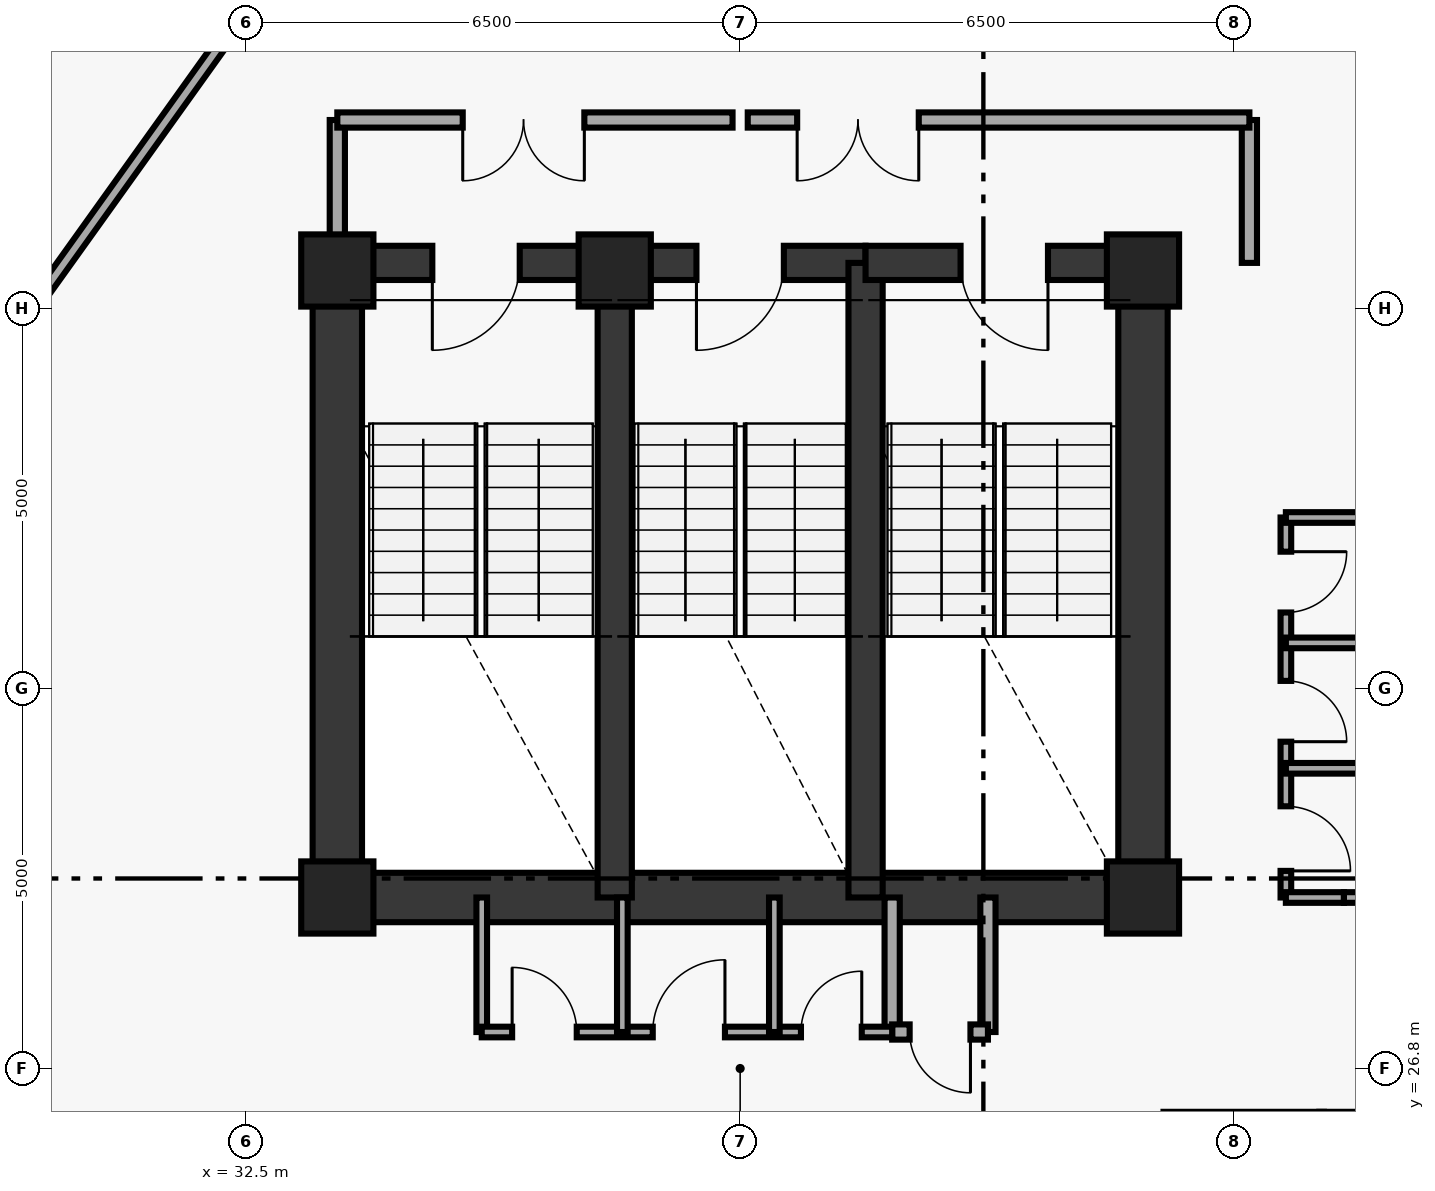
"""IFC4 building model, lengths in metres.
Left out: names, types, materials, properties, quantities, classifications, styles, units other than length and angle.
Written with IfcOpenShell. Run it as: python <this file> out.ifc"""

import sys

from ifc_helpers import new_model, si_unit, direction, frame, frame_2d, origin, origin_2d, place, context, subcontext, project, spatial, rectangle, extrude, element, fill, save


model = new_model("IFC4")
c1 = context("Model", 3, precision=1e-05, world=origin(), true_north=direction((0.0, 1.0)))
c2 = subcontext(c1, "Body", "Model", "MODEL_VIEW")
j1 = project(units=[si_unit("LENGTHUNIT", "METRE"), si_unit("PLANEANGLEUNIT", "RADIAN")], contexts=[c1])
p1 = place(None, origin())
s1 = spatial("IfcSite", under=j1, at=p1, CompositionType="ELEMENT")
p2 = place(p1, origin())
s2 = spatial("IfcBuilding", under=s1, at=p2, CompositionType="ELEMENT")
p3 = place(p2, frame((0.0, 0.0, 195.95)))
s3 = spatial("IfcBuildingStorey", under=s2, at=p3, CompositionType="ELEMENT", Elevation=195.95)
for number, where, z_axis, x_axis in (
    (1, (44.3, 29.05, 0.0), (0.0, 0.0, 1.0), (1.0, 0.0, 0.0)),
    (2, (44.3, 37.3, 0.0), (0.0, 0.0, 1.0), (1.0, 0.0, 0.0)),
    (3, (37.35, 37.3, 0.0), (0.0, 0.0, 1.0), (1.0, 0.0, 0.0)),
    (4, (33.7, 37.3, 0.0), (0.0, 0.0, 1.0), (1.0, 0.0, 0.0)),
    (5, (33.7, 29.05, 0.0), (0.0, 0.0, 1.0), (1.0, 0.0, 0.0)),
):
    element("IfcColumn", number, at=place(p3, frame(where, z_axis=z_axis, x_axis=x_axis)), inside=s3, PredefinedType="PILASTER", context=c2, shape_type="SweptSolid", body=[
        extrude(rectangle(XDim=0.95, YDim=0.95, at=origin_2d()), origin(), (0.0, 0.0, 1.0), 6.88),
    ])
for number, where, z_axis, x_axis in (
    (6, (33.7, 29.05, 0.0), (0.0, 0.0, 1.0), (0.0, 1.0, 0.0)),
    (7, (44.3, 29.05, 0.0), (0.0, 0.0, 1.0), (0.0, 1.0, 0.0)),
):
    element("IfcWall", number, at=place(p3, frame(where, z_axis=z_axis, x_axis=x_axis)), inside=s3, PredefinedType="SHEAR", context=c2, shape_type="SweptSolid", body=[
        extrude(rectangle(XDim=8.35, YDim=0.65, at=frame_2d((4.175, 0.0))), origin(), (0.0, 0.0, 1.0), 6.88),
    ])
p4 = place(p3, frame((33.7, 29.05, 0.0), z_axis=(0.0, 0.0, 1.0), x_axis=(1.0, 0.0, 0.0)))
e8 = element("IfcWall", 8, at=p4, inside=s3, PredefinedType="SHEAR", context=c2, shape_type="SweptSolid", body=[
    extrude(rectangle(XDim=10.6, YDim=0.65, at=frame_2d((5.3, 0.0))), origin(), (0.0, 0.0, 1.0), 6.88),
])
p5 = place(p3, frame((37.35, 37.4, 0.0), z_axis=(0.0, 0.0, 1.0), x_axis=(-1.0, 0.0, 0.0)))
e9 = element("IfcWall", 9, at=p5, inside=s3, PredefinedType="SHEAR", context=c2, shape_type="SweptSolid", body=[
    extrude(rectangle(XDim=3.65, YDim=0.45, at=frame_2d((1.825, 0.0))), origin(), (0.0, 0.0, 1.0), 6.88),
])
p6 = place(p5, frame((1.25, 0.0, 0.0)))
e10 = element("IfcOpeningElement", 10, at=p6, cuts=e9, PredefinedType="OPENING", context=c2, shape_type="SweptSolid", body=[
    extrude(rectangle(XDim=1.15, YDim=2.15, at=frame_2d((0.575, 1.075))), frame((0.0, 0.235, 0.0), z_axis=(0.0, -1.0, 0.0), x_axis=(1.0, 0.0, 0.0)), (0.0, 0.0, 1.0), 0.47),
])
p7 = place(p3, frame((37.35, 29.05, 0.0), z_axis=(0.0, 0.0, 1.0), x_axis=(0.0, 1.0, 0.0)))
e11 = element("IfcWall", 11, at=p7, inside=s3, PredefinedType="SHEAR", context=c2, shape_type="SweptSolid", body=[
    extrude(rectangle(XDim=8.35, YDim=0.45, at=frame_2d((4.175, 0.0))), origin(), (0.0, 0.0, 1.0), 6.88),
])
p8 = place(p3, frame((40.65, 37.4, 0.0), z_axis=(0.0, 0.0, 1.0), x_axis=(-1.0, 0.0, 0.0)))
e12 = element("IfcWall", 12, at=p8, inside=s3, PredefinedType="SHEAR", context=c2, shape_type="SweptSolid", body=[
    extrude(rectangle(XDim=3.3, YDim=0.45, at=frame_2d((1.65, 0.0))), origin(), (0.0, 0.0, 1.0), 6.88),
])
p9 = place(p8, frame((1.075, 0.0, 0.0)))
e13 = element("IfcOpeningElement", 13, at=p9, cuts=e12, PredefinedType="OPENING", context=c2, shape_type="SweptSolid", body=[
    extrude(rectangle(XDim=1.15, YDim=2.15, at=frame_2d((0.575, 1.075))), frame((0.0, 0.235, 0.0), z_axis=(0.0, -1.0, 0.0), x_axis=(1.0, 0.0, 0.0)), (0.0, 0.0, 1.0), 0.47),
])
p10 = place(p3, frame((40.65, 29.05, 0.0), z_axis=(0.0, 0.0, 1.0), x_axis=(0.0, 1.0, 0.0)))
e14 = element("IfcWall", 14, at=p10, inside=s3, PredefinedType="SHEAR", context=c2, shape_type="SweptSolid", body=[
    extrude(rectangle(XDim=8.35, YDim=0.45, at=frame_2d((4.175, 0.0))), origin(), (0.0, 0.0, 1.0), 6.88),
])
p11 = place(p3, frame((44.3, 37.4, 0.0), z_axis=(0.0, 0.0, 1.0), x_axis=(-1.0, 0.0, 0.0)))
e15 = element("IfcWall", 15, at=p11, inside=s3, PredefinedType="SHEAR", context=c2, shape_type="SweptSolid", body=[
    extrude(rectangle(XDim=3.65, YDim=0.45, at=frame_2d((1.825, 0.0))), origin(), (0.0, 0.0, 1.0), 6.88),
])
p12 = place(p11, frame((1.25, 0.0, 0.0)))
e16 = element("IfcOpeningElement", 16, at=p12, cuts=e15, PredefinedType="OPENING", context=c2, shape_type="SweptSolid", body=[
    extrude(rectangle(XDim=1.15, YDim=2.15, at=frame_2d((0.575, 1.075))), frame((0.0, 0.235, 0.0), z_axis=(0.0, -1.0, 0.0), x_axis=(1.0, 0.0, 0.0)), (0.0, 0.0, 1.0), 0.47),
])
for number, where, z_axis, x_axis in (
    (17, (33.7, 37.4, 0.0), (0.0, 0.0, 1.0), (0.0, 1.0, 0.0)),
    (18, (45.7, 37.4, 0.0), (0.0, 0.0, 1.0), (0.0, 1.0, 0.0)),
):
    element("IfcWall", number, at=place(p3, frame(where, z_axis=z_axis, x_axis=x_axis)), inside=s3, PredefinedType="SOLIDWALL", context=c2, shape_type="SweptSolid", body=[
        extrude(rectangle(XDim=1.88, YDim=0.2, at=frame_2d((0.94, 0.0))), origin(), (0.0, 0.0, 1.0), 6.88),
    ])
p13 = place(p3, frame((38.9, 39.28, 0.0), z_axis=(0.0, 0.0, 1.0), x_axis=(-1.0, 0.0, 0.0)))
e19 = element("IfcWall", 19, at=p13, inside=s3, PredefinedType="SOLIDWALL", context=c2, shape_type="SweptSolid", body=[
    extrude(rectangle(XDim=5.2, YDim=0.2, at=frame_2d((2.6, 0.0))), origin(), (0.0, 0.0, 1.0), 6.88),
])
p14 = place(p13, frame((1.95, 0.0, 0.0)))
e20 = element("IfcOpeningElement", 20, at=p14, cuts=e19, PredefinedType="OPENING", context=c2, shape_type="SweptSolid", body=[
    extrude(rectangle(XDim=1.6, YDim=2.2, at=frame_2d((0.8, 1.1))), frame((0.0, 0.11, 0.0), z_axis=(0.0, -1.0, 0.0), x_axis=(1.0, 0.0, 0.0)), (0.0, 0.0, 1.0), 0.22),
])
p15 = place(p3, frame((45.7, 39.28, 0.0), z_axis=(0.0, 0.0, 1.0), x_axis=(-1.0, 0.0, 0.0)))
e21 = element("IfcWall", 21, at=p15, inside=s3, PredefinedType="SOLIDWALL", context=c2, shape_type="SweptSolid", body=[
    extrude(rectangle(XDim=6.6, YDim=0.2, at=frame_2d((3.3, 0.0))), origin(), (0.0, 0.0, 1.0), 6.88),
])
p16 = place(p15, frame((4.35, 0.0, 0.0)))
e22 = element("IfcOpeningElement", 22, at=p16, cuts=e21, PredefinedType="OPENING", context=c2, shape_type="SweptSolid", body=[
    extrude(rectangle(XDim=1.6, YDim=2.2, at=frame_2d((0.8, 1.1))), frame((0.0, 0.11, 0.0), z_axis=(0.0, -1.0, 0.0), x_axis=(1.0, 0.0, 0.0)), (0.0, 0.0, 1.0), 0.22),
])
p17 = place(p3, frame((35.6, 27.28, 0.0), z_axis=(0.0, 0.0, 1.0), x_axis=(0.0, 1.0, 0.0)))
e23 = element("IfcWall", 23, at=p17, inside=s3, PredefinedType="PARTITIONING", context=c2, shape_type="SweptSolid", body=[
    extrude(rectangle(XDim=1.77, YDim=0.14, at=frame_2d((0.885, 0.0))), origin(), (0.0, 0.0, 1.0), 6.88),
])
for number, where, z_axis, x_axis in (
    (24, (41.0, 27.28, 0.0), (0.0, 0.0, 1.0), (0.0, 1.0, 0.0)),
    (25, (42.26, 27.28, 0.0), (0.0, 0.0, 1.0), (0.0, 1.0, 0.0)),
):
    element("IfcWall", number, at=place(p3, frame(where, z_axis=z_axis, x_axis=x_axis)), inside=s3, PredefinedType="SOLIDWALL", context=c2, shape_type="SweptSolid", body=[
        extrude(rectangle(XDim=1.77, YDim=0.2, at=frame_2d((0.885, 0.0))), origin(), (0.0, 0.0, 1.0), 6.88),
    ])
p18 = place(p3, frame((41.0, 27.28, 0.0), z_axis=(0.0, 0.0, 1.0), x_axis=(1.0, 0.0, 0.0)))
e26 = element("IfcWall", 26, at=p18, inside=s3, PredefinedType="SOLIDWALL", context=c2, shape_type="SweptSolid", body=[
    extrude(rectangle(XDim=1.26, YDim=0.2, at=frame_2d((0.63, 0.0))), origin(), (0.0, 0.0, 1.0), 6.88),
])
p19 = place(p18, frame((0.23, 0.0, 0.0)))
e27 = element("IfcOpeningElement", 27, at=p19, cuts=e26, PredefinedType="OPENING", context=c2, shape_type="SweptSolid", body=[
    extrude(rectangle(XDim=0.8, YDim=2.05, at=frame_2d((0.4, 1.025))), frame((0.0, 0.11, 0.0), z_axis=(0.0, -1.0, 0.0), x_axis=(1.0, 0.0, 0.0)), (0.0, 0.0, 1.0), 0.22),
])
p20 = place(p3, frame((35.6, 27.28, 0.0), z_axis=(0.0, 0.0, 1.0), x_axis=(1.0, 0.0, 0.0)))
e28 = element("IfcWall", 28, at=p20, inside=s3, PredefinedType="PARTITIONING", context=c2, shape_type="SweptSolid", body=[
    extrude(rectangle(XDim=5.4, YDim=0.14, at=frame_2d((2.7, 0.0))), origin(), (0.0, 0.0, 1.0), 6.88),
])
p21 = place(p20, frame((0.4, 0.0, 0.0)))
e29 = element("IfcOpeningElement", 29, at=p21, cuts=e28, PredefinedType="OPENING", context=c2, shape_type="SweptSolid", body=[
    extrude(rectangle(XDim=0.85, YDim=2.1, at=frame_2d((0.425, 1.05))), frame((0.0, 0.08, 0.0), z_axis=(0.0, -1.0, 0.0), x_axis=(1.0, 0.0, 0.0)), (0.0, 0.0, 1.0), 0.16),
])
p22 = place(p20, frame((2.25, 0.0, 0.0)))
e30 = element("IfcOpeningElement", 30, at=p22, cuts=e28, PredefinedType="OPENING", context=c2, shape_type="SweptSolid", body=[
    extrude(rectangle(XDim=0.95, YDim=2.1, at=frame_2d((0.475, 1.05))), frame((0.0, 0.08, 0.0), z_axis=(0.0, -1.0, 0.0), x_axis=(1.0, 0.0, 0.0)), (0.0, 0.0, 1.0), 0.16),
])
p23 = place(p20, frame((4.2, 0.0, 0.0)))
e31 = element("IfcOpeningElement", 31, at=p23, cuts=e28, PredefinedType="OPENING", context=c2, shape_type="SweptSolid", body=[
    extrude(rectangle(XDim=0.8, YDim=2.05, at=frame_2d((0.4, 1.025))), frame((0.0, 0.08, 0.0), z_axis=(0.0, -1.0, 0.0), x_axis=(1.0, 0.0, 0.0)), (0.0, 0.0, 1.0), 0.16),
])
for number, where, z_axis, x_axis in (
    (32, (37.45, 27.28, 0.0), (0.0, 0.0, 1.0), (0.0, 1.0, 0.0)),
    (33, (39.45, 27.28, 0.0), (0.0, 0.0, 1.0), (0.0, 1.0, 0.0)),
):
    element("IfcWall", number, at=place(p3, frame(where, z_axis=z_axis, x_axis=x_axis)), inside=s3, PredefinedType="PARTITIONING", context=c2, shape_type="SweptSolid", body=[
        extrude(rectangle(XDim=1.77, YDim=0.14, at=frame_2d((0.885, 0.0))), origin(), (0.0, 0.0, 1.0), 6.88),
    ])
p24 = place(p3, frame((46.18, 34.05, 0.0), z_axis=(0.0, 0.0, 1.0), x_axis=(0.0, -1.0, 0.0)))
e34 = element("IfcWall", 34, at=p24, inside=s3, PredefinedType="PARTITIONING", context=c2, shape_type="SweptSolid", body=[
    extrude(rectangle(XDim=5.0, YDim=0.14, at=frame_2d((2.5, 0.0))), origin(), (0.0, 0.0, 1.0), 6.88),
])
p25 = place(p24, frame((3.8, 0.0, 0.0)))
e35 = element("IfcOpeningElement", 35, at=p25, cuts=e34, PredefinedType="OPENING", context=c2, shape_type="SweptSolid", body=[
    extrude(rectangle(XDim=0.85, YDim=2.1, at=frame_2d((0.425, 1.05))), frame((0.0, 0.08, 0.0), z_axis=(0.0, -1.0, 0.0), x_axis=(1.0, 0.0, 0.0)), (0.0, 0.0, 1.0), 0.16),
])
p26 = place(p24, frame((2.15, 0.0, 0.0)))
e36 = element("IfcOpeningElement", 36, at=p26, cuts=e34, PredefinedType="OPENING", context=c2, shape_type="SweptSolid", body=[
    extrude(rectangle(XDim=0.8, YDim=2.05, at=frame_2d((0.4, 1.025))), frame((0.0, 0.08, 0.0), z_axis=(0.0, -1.0, 0.0), x_axis=(1.0, 0.0, 0.0)), (0.0, 0.0, 1.0), 0.16),
])
p27 = place(p24, frame((0.45, 0.0, 0.0)))
e37 = element("IfcOpeningElement", 37, at=p27, cuts=e34, PredefinedType="OPENING", context=c2, shape_type="SweptSolid", body=[
    extrude(rectangle(XDim=0.8, YDim=2.05, at=frame_2d((0.4, 1.025))), frame((0.0, 0.08, 0.0), z_axis=(0.0, -1.0, 0.0), x_axis=(1.0, 0.0, 0.0)), (0.0, 0.0, 1.0), 0.16),
])
p28 = place(p3, frame((46.18, 29.05, 0.0), z_axis=(0.0, 0.0, 1.0), x_axis=(1.0, 0.0, 0.0)))
e38 = element("IfcWall", 38, at=p28, inside=s3, PredefinedType="PARTITIONING", context=c2, shape_type="SweptSolid", body=[
    extrude(rectangle(XDim=0.764, YDim=0.14, at=frame_2d((0.382, 0.0))), origin(), (0.0, 0.0, 1.0), 4.88),
])
p29 = place(p3, frame((46.944, 29.05, 0.0), z_axis=(0.0, 0.0, 1.0), x_axis=(1.0, 0.0, 0.0)))
e39 = element("IfcWall", 39, at=p29, inside=s3, PredefinedType="PARTITIONING", context=c2, shape_type="SweptSolid", body=[
    extrude(rectangle(XDim=0.876, YDim=0.14, at=frame_2d((0.438, 0.0))), origin(), (0.0, 0.0, 1.0), 6.88),
])
for number, where, z_axis, x_axis in (
    (40, (46.18, 30.75, 0.0), (0.0, 0.0, 1.0), (1.0, 0.0, 0.0)),
    (41, (46.18, 32.4, 0.0), (0.0, 0.0, 1.0), (1.0, 0.0, 0.0)),
    (42, (46.18, 34.05, 0.0), (0.0, 0.0, 1.0), (1.0, 0.0, 0.0)),
):
    element("IfcWall", number, at=place(p3, frame(where, z_axis=z_axis, x_axis=x_axis)), inside=s3, PredefinedType="PARTITIONING", context=c2, shape_type="SweptSolid", body=[
        extrude(rectangle(XDim=1.64, YDim=0.14, at=frame_2d((0.82, 0.0))), origin(), (0.0, 0.0, 1.0), 6.88),
    ])
p30 = place(p3, frame((51.552, 35.291, 0.0), z_axis=(0.0, 0.0, 1.0), x_axis=(-0.661421630005, 0.750014284772, 0.0)))
e43 = element("IfcWall", 43, at=p30, inside=s3, PredefinedType="PARTITIONING", context=c2, shape_type="SweptSolid", body=[
    extrude(rectangle(XDim=8.116, YDim=0.16, at=frame_2d((4.058, 0.0))), origin(), (0.0, 0.0, 1.0), 6.88),
])
p31 = place(p3, frame((32.281, 40.436, 0.0), z_axis=(0.0, 0.0, 1.0), x_axis=(-0.581884927471, -0.813271130179, 0.0)))
e44 = element("IfcWall", 44, at=p31, inside=s3, PredefinedType="PARTITIONING", context=c2, shape_type="SweptSolid", body=[
    extrude(rectangle(XDim=7.532, YDim=0.16, at=frame_2d((3.766, 0.0))), origin(), (0.0, 0.0, 1.0), 6.88),
])
p32 = place(p6, origin())
e45 = element("IfcDoor", 45, at=p32, inside=s3, OperationType="SINGLE_SWING_RIGHT", PredefinedType="DOOR", context=c2, shape_type="SweptSolid", body=[
    extrude(rectangle(XDim=1.15, YDim=2.15, at=frame_2d((0.575, 1.075))), frame((0.0, 0.025, 0.0), z_axis=(0.0, -1.0, 0.0), x_axis=(1.0, 0.0, 0.0)), (0.0, 0.0, 1.0), 0.05),
])
fill(e10, e45)
p33 = place(p9, origin())
e46 = element("IfcDoor", 46, at=p33, inside=s3, OperationType="SINGLE_SWING_RIGHT", PredefinedType="DOOR", context=c2, shape_type="SweptSolid", body=[
    extrude(rectangle(XDim=1.15, YDim=2.15, at=frame_2d((0.575, 1.075))), frame((0.0, 0.025, 0.0), z_axis=(0.0, -1.0, 0.0), x_axis=(1.0, 0.0, 0.0)), (0.0, 0.0, 1.0), 0.05),
])
fill(e13, e46)
p34 = place(p12, origin())
e47 = element("IfcDoor", 47, at=p34, inside=s3, OperationType="SINGLE_SWING_LEFT", PredefinedType="DOOR", context=c2, shape_type="SweptSolid", body=[
    extrude(rectangle(XDim=1.15, YDim=2.15, at=frame_2d((0.575, 1.075))), frame((0.0, 0.025, 0.0), z_axis=(0.0, -1.0, 0.0), x_axis=(1.0, 0.0, 0.0)), (0.0, 0.0, 1.0), 0.05),
])
fill(e16, e47)
p35 = place(p14, origin())
e48 = element("IfcDoor", 48, at=p35, inside=s3, OperationType="DOUBLE_DOOR_SINGLE_SWING", PredefinedType="DOOR", context=c2, shape_type="SweptSolid", body=[
    extrude(rectangle(XDim=1.6, YDim=2.2, at=frame_2d((0.8, 1.1))), frame((0.0, 0.025, 0.0), z_axis=(0.0, -1.0, 0.0), x_axis=(1.0, 0.0, 0.0)), (0.0, 0.0, 1.0), 0.05),
])
fill(e20, e48)
p36 = place(p16, origin())
e49 = element("IfcDoor", 49, at=p36, inside=s3, OperationType="DOUBLE_DOOR_SINGLE_SWING", PredefinedType="DOOR", context=c2, shape_type="SweptSolid", body=[
    extrude(rectangle(XDim=1.6, YDim=2.2, at=frame_2d((0.8, 1.1))), frame((0.0, 0.025, 0.0), z_axis=(0.0, -1.0, 0.0), x_axis=(1.0, 0.0, 0.0)), (0.0, 0.0, 1.0), 0.05),
])
fill(e22, e49)
p37 = place(p19, origin())
e50 = element("IfcDoor", 50, at=p37, inside=s3, OperationType="SINGLE_SWING_RIGHT", PredefinedType="DOOR", context=c2, shape_type="SweptSolid", body=[
    extrude(rectangle(XDim=0.8, YDim=2.05, at=frame_2d((0.4, 1.025))), frame((0.0, 0.025, 0.0), z_axis=(0.0, -1.0, 0.0), x_axis=(1.0, 0.0, 0.0)), (0.0, 0.0, 1.0), 0.05),
])
fill(e27, e50)
p38 = place(p21, origin())
e51 = element("IfcDoor", 51, at=p38, inside=s3, OperationType="SINGLE_SWING_LEFT", PredefinedType="DOOR", context=c2, shape_type="SweptSolid", body=[
    extrude(rectangle(XDim=0.85, YDim=2.1, at=frame_2d((0.425, 1.05))), frame((0.0, 0.025, 0.0), z_axis=(0.0, -1.0, 0.0), x_axis=(1.0, 0.0, 0.0)), (0.0, 0.0, 1.0), 0.05),
])
fill(e29, e51)
p39 = place(p22, origin())
e52 = element("IfcDoor", 52, at=p39, inside=s3, OperationType="SINGLE_SWING_RIGHT", PredefinedType="DOOR", context=c2, shape_type="SweptSolid", body=[
    extrude(rectangle(XDim=0.95, YDim=2.1, at=frame_2d((0.475, 1.05))), frame((0.0, 0.025, 0.0), z_axis=(0.0, -1.0, 0.0), x_axis=(1.0, 0.0, 0.0)), (0.0, 0.0, 1.0), 0.05),
])
fill(e30, e52)
p40 = place(p23, origin())
e53 = element("IfcDoor", 53, at=p40, inside=s3, OperationType="SINGLE_SWING_RIGHT", PredefinedType="DOOR", context=c2, shape_type="SweptSolid", body=[
    extrude(rectangle(XDim=0.8, YDim=2.05, at=frame_2d((0.4, 1.025))), frame((0.0, 0.025, 0.0), z_axis=(0.0, -1.0, 0.0), x_axis=(1.0, 0.0, 0.0)), (0.0, 0.0, 1.0), 0.05),
])
fill(e31, e53)
p41 = place(p25, origin())
e54 = element("IfcDoor", 54, at=p41, inside=s3, OperationType="SINGLE_SWING_RIGHT", PredefinedType="DOOR", context=c2, shape_type="SweptSolid", body=[
    extrude(rectangle(XDim=0.85, YDim=2.1, at=frame_2d((0.425, 1.05))), frame((0.0, 0.025, 0.0), z_axis=(0.0, -1.0, 0.0), x_axis=(1.0, 0.0, 0.0)), (0.0, 0.0, 1.0), 0.05),
])
fill(e35, e54)
p42 = place(p26, origin())
e55 = element("IfcDoor", 55, at=p42, inside=s3, OperationType="SINGLE_SWING_RIGHT", PredefinedType="DOOR", context=c2, shape_type="SweptSolid", body=[
    extrude(rectangle(XDim=0.8, YDim=2.05, at=frame_2d((0.4, 1.025))), frame((0.0, 0.025, 0.0), z_axis=(0.0, -1.0, 0.0), x_axis=(1.0, 0.0, 0.0)), (0.0, 0.0, 1.0), 0.05),
])
fill(e36, e55)
p43 = place(p27, origin())
e56 = element("IfcDoor", 56, at=p43, inside=s3, OperationType="SINGLE_SWING_LEFT", PredefinedType="DOOR", context=c2, shape_type="SweptSolid", body=[
    extrude(rectangle(XDim=0.8, YDim=2.05, at=frame_2d((0.4, 1.025))), frame((0.0, 0.025, 0.0), z_axis=(0.0, -1.0, 0.0), x_axis=(1.0, 0.0, 0.0)), (0.0, 0.0, 1.0), 0.05),
])
fill(e37, e56)
save(model, sys.argv[1])
